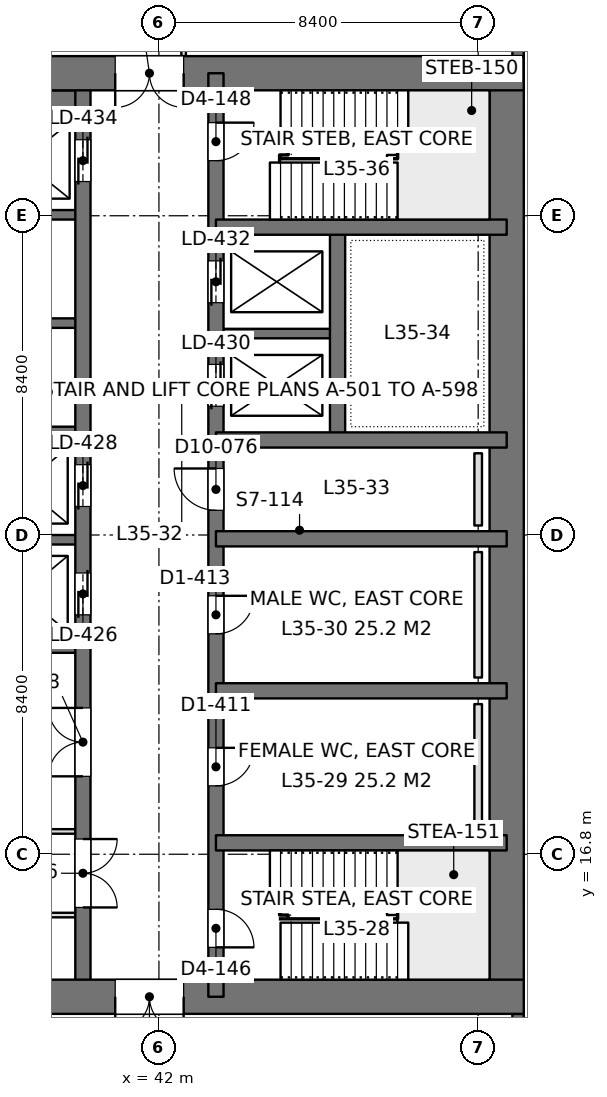
"""IFC4 building model, lengths in metres.
Left out: names, types, materials, properties, quantities, classifications, styles, units other than length and angle.
Written with IfcOpenShell. Run it as: python <this file> out.ifc"""

import sys

from ifc_helpers import new_model, si_unit, direction, frame, frame_2d, origin, place, context, subcontext, project, spatial, rectangle, extrude, element, fill, save


model = new_model("IFC4")
c1 = context("Model", 3, precision=1e-05, world=origin(), true_north=direction((0.0, 1.0)))
c2 = subcontext(c1, "Body", "Model", "MODEL_VIEW")
j1 = project(units=[si_unit("LENGTHUNIT", "METRE"), si_unit("PLANEANGLEUNIT", "RADIAN")], contexts=[c1])
p1 = place(None, origin())
s1 = spatial("IfcSite", under=j1, at=p1, CompositionType="ELEMENT")
p2 = place(p1, origin())
s2 = spatial("IfcBuilding", under=s1, at=p2, CompositionType="ELEMENT")
p3 = place(p2, frame((0.0, 0.0, 155.4)))
s3 = spatial("IfcBuildingStorey", under=s2, at=p3, CompositionType="ELEMENT", Elevation=155.4)
p4 = place(p3, frame((33.6, 13.05, 0.0), z_axis=(0.0, 0.0, 1.0), x_axis=(1.0, 0.0, 0.0)))
e1 = element("IfcWall", 1, at=p4, inside=s3, PredefinedType="SHEAR", context=c2, shape_type="SweptSolid", body=[
    extrude(rectangle(XDim=18.0, YDim=0.9, at=frame_2d((9.0, 0.0))), origin(), (0.0, 0.0, 1.0), 4.2),
])
p5 = place(p4, frame((7.25, 0.0, 0.0)))
e2 = element("IfcOpeningElement", 2, at=p5, cuts=e1, PredefinedType="OPENING", context=c2, shape_type="SweptSolid", body=[
    extrude(rectangle(XDim=1.8, YDim=2.4, at=frame_2d((0.9, 1.2))), frame((0.0, 0.46, 0.0), z_axis=(0.0, -1.0, 0.0), x_axis=(1.0, 0.0, 0.0)), (0.0, 0.0, 1.0), 0.92),
])
p6 = place(p3, frame((33.6, 37.35, 0.0), z_axis=(0.0, 0.0, 1.0), x_axis=(1.0, 0.0, 0.0)))
e3 = element("IfcWall", 3, at=p6, inside=s3, PredefinedType="SHEAR", context=c2, shape_type="SweptSolid", body=[
    extrude(rectangle(XDim=18.0, YDim=0.9, at=frame_2d((9.0, 0.0))), origin(), (0.0, 0.0, 1.0), 4.2),
])
p7 = place(p6, frame((7.25, 0.0, 0.0)))
e4 = element("IfcOpeningElement", 4, at=p7, cuts=e3, PredefinedType="OPENING", context=c2, shape_type="SweptSolid", body=[
    extrude(rectangle(XDim=1.8, YDim=2.4, at=frame_2d((0.9, 1.2))), frame((0.0, 0.46, 0.0), z_axis=(0.0, -1.0, 0.0), x_axis=(1.0, 0.0, 0.0)), (0.0, 0.0, 1.0), 0.92),
])
p8 = place(p3, frame((51.15, 13.05, 0.0), z_axis=(0.0, 0.0, 1.0), x_axis=(0.0, 1.0, 0.0)))
e5 = element("IfcWall", 5, at=p8, inside=s3, PredefinedType="SHEAR", context=c2, shape_type="SweptSolid", body=[
    extrude(rectangle(XDim=24.3, YDim=0.9, at=frame_2d((12.15, 0.0))), origin(), (0.0, 0.0, 1.0), 4.2),
])
p9 = place(p3, frame((43.5, 13.05, 0.0), z_axis=(0.0, 0.0, 1.0), x_axis=(0.0, 1.0, 0.0)))
e6 = element("IfcWall", 6, at=p9, inside=s3, PredefinedType="SHEAR", context=c2, shape_type="SweptSolid", body=[
    extrude(rectangle(XDim=24.3, YDim=0.4, at=frame_2d((12.15, 0.0))), origin(), (0.0, 0.0, 1.0), 4.2),
])
p10 = place(p9, frame((1.3, 0.0, 0.0)))
e7 = element("IfcOpeningElement", 7, at=p10, cuts=e6, PredefinedType="OPENING", context=c2, shape_type="SweptSolid", body=[
    extrude(rectangle(XDim=1.0, YDim=2.2, at=frame_2d((0.5, 1.1))), frame((0.0, 0.21, 0.0), z_axis=(0.0, -1.0, 0.0), x_axis=(1.0, 0.0, 0.0)), (0.0, 0.0, 1.0), 0.42),
])
p11 = place(p9, frame((22.0, 0.0, 0.0)))
e8 = element("IfcOpeningElement", 8, at=p11, cuts=e6, PredefinedType="OPENING", context=c2, shape_type="SweptSolid", body=[
    extrude(rectangle(XDim=1.0, YDim=2.2, at=frame_2d((0.5, 1.1))), frame((0.0, 0.21, 0.0), z_axis=(0.0, -1.0, 0.0), x_axis=(1.0, 0.0, 0.0)), (0.0, 0.0, 1.0), 0.42),
])
p12 = place(p9, frame((5.55, 0.0, 0.0)))
e9 = element("IfcOpeningElement", 9, at=p12, cuts=e6, PredefinedType="OPENING", context=c2, shape_type="SweptSolid", body=[
    extrude(rectangle(XDim=1.0, YDim=2.2, at=frame_2d((0.5, 1.1))), frame((0.0, 0.21, 0.0), z_axis=(0.0, -1.0, 0.0), x_axis=(1.0, 0.0, 0.0)), (0.0, 0.0, 1.0), 0.42),
])
p13 = place(p9, frame((9.55, 0.0, 0.0)))
e10 = element("IfcOpeningElement", 10, at=p13, cuts=e6, PredefinedType="OPENING", context=c2, shape_type="SweptSolid", body=[
    extrude(rectangle(XDim=1.0, YDim=2.2, at=frame_2d((0.5, 1.1))), frame((0.0, 0.21, 0.0), z_axis=(0.0, -1.0, 0.0), x_axis=(1.0, 0.0, 0.0)), (0.0, 0.0, 1.0), 0.42),
])
p14 = place(p9, frame((12.8, 0.0, 0.0)))
e11 = element("IfcOpeningElement", 11, at=p14, cuts=e6, PredefinedType="OPENING", context=c2, shape_type="SweptSolid", body=[
    extrude(rectangle(XDim=1.1, YDim=2.2, at=frame_2d((0.55, 1.1))), frame((0.0, 0.21, 0.0), z_axis=(0.0, -1.0, 0.0), x_axis=(1.0, 0.0, 0.0)), (0.0, 0.0, 1.0), 0.42),
])
p15 = place(p9, frame((15.538, 0.0, 0.0)))
e12 = element("IfcOpeningElement", 12, at=p15, cuts=e6, PredefinedType="OPENING", context=c2, shape_type="SweptSolid", body=[
    extrude(rectangle(XDim=1.1, YDim=2.2, at=frame_2d((0.55, 1.1))), frame((0.0, 0.21, 0.0), z_axis=(0.0, -1.0, 0.0), x_axis=(1.0, 0.0, 0.0)), (0.0, 0.0, 1.0), 0.42),
])
p16 = place(p9, frame((18.262, 0.0, 0.0)))
e13 = element("IfcOpeningElement", 13, at=p16, cuts=e6, PredefinedType="OPENING", context=c2, shape_type="SweptSolid", body=[
    extrude(rectangle(XDim=1.1, YDim=2.2, at=frame_2d((0.55, 1.1))), frame((0.0, 0.21, 0.0), z_axis=(0.0, -1.0, 0.0), x_axis=(1.0, 0.0, 0.0)), (0.0, 0.0, 1.0), 0.42),
])
p17 = place(p3, frame((40.0, 13.05, 0.0), z_axis=(0.0, 0.0, 1.0), x_axis=(0.0, 1.0, 0.0)))
e14 = element("IfcWall", 14, at=p17, inside=s3, PredefinedType="SHEAR", context=c2, shape_type="SweptSolid", body=[
    extrude(rectangle(XDim=24.3, YDim=0.4, at=frame_2d((12.15, 0.0))), origin(), (0.0, 0.0, 1.0), 4.2),
])
p18 = place(p17, frame((10.05, 0.0, 0.0)))
e15 = element("IfcOpeningElement", 15, at=p18, cuts=e14, PredefinedType="OPENING", context=c2, shape_type="SweptSolid", body=[
    extrude(rectangle(XDim=1.1, YDim=2.2, at=frame_2d((0.55, 1.1))), frame((0.0, 0.21, 0.0), z_axis=(0.0, -1.0, 0.0), x_axis=(1.0, 0.0, 0.0)), (0.0, 0.0, 1.0), 0.42),
])
p19 = place(p17, frame((12.9, 0.0, 0.0)))
e16 = element("IfcOpeningElement", 16, at=p19, cuts=e14, PredefinedType="OPENING", context=c2, shape_type="SweptSolid", body=[
    extrude(rectangle(XDim=1.1, YDim=2.2, at=frame_2d((0.55, 1.1))), frame((0.0, 0.21, 0.0), z_axis=(0.0, -1.0, 0.0), x_axis=(1.0, 0.0, 0.0)), (0.0, 0.0, 1.0), 0.42),
])
p20 = place(p17, frame((21.45, 0.0, 0.0)))
e17 = element("IfcOpeningElement", 17, at=p20, cuts=e14, PredefinedType="OPENING", context=c2, shape_type="SweptSolid", body=[
    extrude(rectangle(XDim=1.1, YDim=2.2, at=frame_2d((0.55, 1.1))), frame((0.0, 0.21, 0.0), z_axis=(0.0, -1.0, 0.0), x_axis=(1.0, 0.0, 0.0)), (0.0, 0.0, 1.0), 0.42),
])
p21 = place(p17, frame((2.35, 0.0, 0.0)))
e18 = element("IfcOpeningElement", 18, at=p21, cuts=e14, PredefinedType="OPENING", context=c2, shape_type="SweptSolid", body=[
    extrude(rectangle(XDim=1.8, YDim=2.4, at=frame_2d((0.9, 1.2))), frame((0.0, 0.21, 0.0), z_axis=(0.0, -1.0, 0.0), x_axis=(1.0, 0.0, 0.0)), (0.0, 0.0, 1.0), 0.42),
])
p22 = place(p17, frame((5.8, 0.0, 0.0)))
e19 = element("IfcOpeningElement", 19, at=p22, cuts=e14, PredefinedType="OPENING", context=c2, shape_type="SweptSolid", body=[
    extrude(rectangle(XDim=1.8, YDim=2.4, at=frame_2d((0.9, 1.2))), frame((0.0, 0.21, 0.0), z_axis=(0.0, -1.0, 0.0), x_axis=(1.0, 0.0, 0.0)), (0.0, 0.0, 1.0), 0.42),
])
for number, where, z_axis, x_axis in (
    (20, (51.15, 17.1, 0.0), (0.0, 0.0, 1.0), (-1.0, 0.0, 0.0)),
    (21, (51.15, 21.1, 0.0), (0.0, 0.0, 1.0), (-1.0, 0.0, 0.0)),
    (22, (51.15, 25.1, 0.0), (0.0, 0.0, 1.0), (-1.0, 0.0, 0.0)),
    (23, (51.15, 27.7, 0.0), (0.0, 0.0, 1.0), (-1.0, 0.0, 0.0)),
    (24, (51.15, 33.3, 0.0), (0.0, 0.0, 1.0), (-1.0, 0.0, 0.0)),
):
    element("IfcWall", number, at=place(p3, frame(where, z_axis=z_axis, x_axis=x_axis)), inside=s3, PredefinedType="SHEAR", context=c2, shape_type="SweptSolid", body=[
        extrude(rectangle(XDim=7.65, YDim=0.4, at=frame_2d((3.825, 0.0))), origin(), (0.0, 0.0, 1.0), 4.2),
    ])
p23 = place(p3, frame((46.7, 27.7, 0.0), z_axis=(0.0, 0.0, 1.0), x_axis=(0.0, 1.0, 0.0)))
e25 = element("IfcWall", 25, at=p23, inside=s3, PredefinedType="SHEAR", context=c2, shape_type="SweptSolid", body=[
    extrude(rectangle(XDim=5.6, YDim=0.4, at=frame_2d((2.8, 0.0))), origin(), (0.0, 0.0, 1.0), 4.2),
])
p24 = place(p3, frame((46.7, 30.5, 0.0), z_axis=(0.0, 0.0, 1.0), x_axis=(-1.0, 0.0, 0.0)))
e26 = element("IfcWall", 26, at=p24, inside=s3, PredefinedType="SHEAR", context=c2, shape_type="SweptSolid", body=[
    extrude(rectangle(XDim=3.2, YDim=0.25, at=frame_2d((1.6, 0.0))), origin(), (0.0, 0.0, 1.0), 4.2),
])
p25 = place(p3, frame((40.0, 22.225, 0.0), z_axis=(0.0, 0.0, 1.0), x_axis=(-1.0, 0.0, 0.0)))
e27 = element("IfcWall", 27, at=p25, inside=s3, PredefinedType="SHEAR", context=c2, shape_type="SweptSolid", body=[
    extrude(rectangle(XDim=5.95, YDim=0.25, at=frame_2d((2.975, 0.0))), origin(), (0.0, 0.0, 1.0), 4.2),
])
for number, where, z_axis, x_axis in (
    (28, (40.0, 25.075, 0.0), (0.0, 0.0, 1.0), (-1.0, 0.0, 0.0)),
    (29, (40.0, 27.925, 0.0), (0.0, 0.0, 1.0), (-1.0, 0.0, 0.0)),
    (30, (40.0, 30.775, 0.0), (0.0, 0.0, 1.0), (-1.0, 0.0, 0.0)),
    (31, (40.0, 33.625, 0.0), (0.0, 0.0, 1.0), (-1.0, 0.0, 0.0)),
):
    element("IfcWall", number, at=place(p3, frame(where, z_axis=z_axis, x_axis=x_axis)), inside=s3, PredefinedType="SHEAR", context=c2, shape_type="SweptSolid", body=[
        extrude(rectangle(XDim=3.2, YDim=0.25, at=frame_2d((1.6, 0.0))), origin(), (0.0, 0.0, 1.0), 4.2),
    ])
p26 = place(p3, frame((40.0, 36.625, 0.0), z_axis=(0.0, 0.0, 1.0), x_axis=(-1.0, 0.0, 0.0)))
e32 = element("IfcWall", 32, at=p26, inside=s3, PredefinedType="SHEAR", context=c2, shape_type="SweptSolid", body=[
    extrude(rectangle(XDim=3.2, YDim=0.55, at=frame_2d((1.6, 0.0))), origin(), (0.0, 0.0, 1.0), 4.2),
])
p27 = place(p3, frame((51.45, 42.0, 0.0), z_axis=(0.0, 0.0, 1.0), x_axis=(0.0, -1.0, 0.0)))
e33 = element("IfcWall", 33, at=p27, inside=s3, PredefinedType="SOLIDWALL", context=c2, shape_type="SweptSolid", body=[
    extrude(rectangle(XDim=4.2, YDim=0.3, at=frame_2d((2.1, 0.0))), origin(), (0.0, 0.0, 1.0), 4.05),
])
p28 = place(p27, frame((0.9, 0.0, 0.9)))
e34 = element("IfcOpeningElement", 34, at=p28, cuts=e33, PredefinedType="OPENING", context=c2, shape_type="SweptSolid", body=[
    extrude(rectangle(XDim=2.4, YDim=1.9, at=frame_2d((1.2, 0.95))), frame((0.0, 0.16, 0.0), z_axis=(0.0, -1.0, 0.0), x_axis=(1.0, 0.0, 0.0)), (0.0, 0.0, 1.0), 0.32),
])
p29 = place(p3, frame((51.45, 12.6, 0.0), z_axis=(0.0, 0.0, 1.0), x_axis=(0.0, -1.0, 0.0)))
e35 = element("IfcWall", 35, at=p29, inside=s3, PredefinedType="SOLIDWALL", context=c2, shape_type="SweptSolid", body=[
    extrude(rectangle(XDim=4.2, YDim=0.3, at=frame_2d((2.1, 0.0))), origin(), (0.0, 0.0, 1.0), 4.05),
])
p30 = place(p29, frame((0.9, 0.0, 0.9)))
e36 = element("IfcOpeningElement", 36, at=p30, cuts=e35, PredefinedType="OPENING", context=c2, shape_type="SweptSolid", body=[
    extrude(rectangle(XDim=2.4, YDim=1.9, at=frame_2d((1.2, 0.95))), frame((0.0, 0.16, 0.0), z_axis=(0.0, -1.0, 0.0), x_axis=(1.0, 0.0, 0.0)), (0.0, 0.0, 1.0), 0.32),
])
p31 = place(p3, frame((33.898, 17.4, 0.0), z_axis=(0.0, 0.0, 1.0), x_axis=(1.0, 0.0, 0.0)))
e37 = element("IfcWall", 37, at=p31, inside=s3, PredefinedType="PARTITIONING", context=c2, shape_type="SweptSolid", body=[
    extrude(rectangle(XDim=5.904, YDim=0.12, at=frame_2d((2.952, 0.0))), origin(), (0.0, 0.0, 1.0), 3.55),
])
p32 = place(p31, frame((0.38, 0.0, 0.0)))
e38 = element("IfcOpeningElement", 38, at=p32, cuts=e37, PredefinedType="OPENING", context=c2, shape_type="SweptSolid", body=[
    extrude(rectangle(XDim=1.0, YDim=2.4, at=frame_2d((0.5, 1.2))), frame((0.0, 0.07, 0.0), z_axis=(0.0, -1.0, 0.0), x_axis=(1.0, 0.0, 0.0)), (0.0, 0.0, 1.0), 0.14),
])
p33 = place(p3, frame((33.598, 15.2, 0.0), z_axis=(0.0, 0.0, 1.0), x_axis=(1.0, 0.0, 0.0)))
e39 = element("IfcWall", 39, at=p33, inside=s3, PredefinedType="PARTITIONING", context=c2, shape_type="SweptSolid", body=[
    extrude(rectangle(XDim=6.204, YDim=0.12, at=frame_2d((3.102, 0.0))), origin(), (0.0, 0.0, 1.0), 3.55),
])
p34 = place(p3, frame((42.65, 37.8, 0.0), z_axis=(0.0, 0.0, 1.0), x_axis=(0.0, 1.0, 0.0)))
e40 = element("IfcWall", 40, at=p34, inside=s3, PredefinedType="PARTITIONING", context=c2, shape_type="SweptSolid", body=[
    extrude(rectangle(XDim=2.0, YDim=0.12, at=frame_2d((1.0, 0.0))), origin(), (0.0, 0.0, 1.0), 4.05),
])
for number, where, z_axis, x_axis in (
    (41, (50.4, 17.45, 0.0), (0.0, 0.0, 1.0), (0.0, 1.0, 0.0)),
    (42, (50.4, 21.45, 0.0), (0.0, 0.0, 1.0), (0.0, 1.0, 0.0)),
):
    element("IfcWall", number, at=place(p3, frame(where, z_axis=z_axis, x_axis=x_axis)), inside=s3, PredefinedType="PLUMBINGWALL", context=c2, shape_type="SweptSolid", body=[
        extrude(rectangle(XDim=3.3, YDim=0.2, at=frame_2d((1.65, 0.0))), origin(), (0.0, 0.0, 1.0), 1.2),
    ])
p35 = place(p3, frame((50.4, 25.45, 0.0), z_axis=(0.0, 0.0, 1.0), x_axis=(0.0, 1.0, 0.0)))
e43 = element("IfcWall", 43, at=p35, inside=s3, PredefinedType="PLUMBINGWALL", context=c2, shape_type="SweptSolid", body=[
    extrude(rectangle(XDim=1.9, YDim=0.2, at=frame_2d((0.95, 0.0))), origin(), (0.0, 0.0, 1.0), 1.2),
])
p36 = place(p5, frame((1.8, 0.0, 0.0), z_axis=(0.0, 0.0, 1.0), x_axis=(-1.0, 0.0, 0.0)))
e44 = element("IfcDoor", 44, at=p36, inside=s3, OperationType="DOUBLE_DOOR_SINGLE_SWING", PredefinedType="DOOR", context=c2, shape_type="SweptSolid", body=[
    extrude(rectangle(XDim=1.8, YDim=2.4, at=frame_2d((0.9, 1.2))), frame((0.0, 0.025, 0.0), z_axis=(0.0, -1.0, 0.0), x_axis=(1.0, 0.0, 0.0)), (0.0, 0.0, 1.0), 0.05),
])
fill(e2, e44)
p37 = place(p7, frame((1.8, 0.0, 0.0), z_axis=(0.0, 0.0, 1.0), x_axis=(-1.0, 0.0, 0.0)))
e45 = element("IfcDoor", 45, at=p37, inside=s3, OperationType="DOUBLE_DOOR_SINGLE_SWING", PredefinedType="DOOR", context=c2, shape_type="SweptSolid", body=[
    extrude(rectangle(XDim=1.8, YDim=2.4, at=frame_2d((0.9, 1.2))), frame((0.0, 0.025, 0.0), z_axis=(0.0, -1.0, 0.0), x_axis=(1.0, 0.0, 0.0)), (0.0, 0.0, 1.0), 0.05),
])
fill(e4, e45)
p38 = place(p10, frame((1.0, 0.0, 0.0), z_axis=(0.0, 0.0, 1.0), x_axis=(-1.0, 0.0, 0.0)))
e46 = element("IfcDoor", 46, at=p38, inside=s3, OperationType="SINGLE_SWING_RIGHT", PredefinedType="DOOR", context=c2, shape_type="SweptSolid", body=[
    extrude(rectangle(XDim=1.0, YDim=2.2, at=frame_2d((0.5, 1.1))), frame((0.0, 0.025, 0.0), z_axis=(0.0, -1.0, 0.0), x_axis=(1.0, 0.0, 0.0)), (0.0, 0.0, 1.0), 0.05),
])
fill(e7, e46)
p39 = place(p11, frame((1.0, 0.0, 0.0), z_axis=(0.0, 0.0, 1.0), x_axis=(-1.0, 0.0, 0.0)))
e47 = element("IfcDoor", 47, at=p39, inside=s3, OperationType="SINGLE_SWING_LEFT", PredefinedType="DOOR", context=c2, shape_type="SweptSolid", body=[
    extrude(rectangle(XDim=1.0, YDim=2.2, at=frame_2d((0.5, 1.1))), frame((0.0, 0.025, 0.0), z_axis=(0.0, -1.0, 0.0), x_axis=(1.0, 0.0, 0.0)), (0.0, 0.0, 1.0), 0.05),
])
fill(e8, e47)
p40 = place(p12, frame((1.0, 0.0, 0.0), z_axis=(0.0, 0.0, 1.0), x_axis=(-1.0, 0.0, 0.0)))
e48 = element("IfcDoor", 48, at=p40, inside=s3, OperationType="SINGLE_SWING_LEFT", PredefinedType="DOOR", context=c2, shape_type="SweptSolid", body=[
    extrude(rectangle(XDim=1.0, YDim=2.2, at=frame_2d((0.5, 1.1))), frame((0.0, 0.025, 0.0), z_axis=(0.0, -1.0, 0.0), x_axis=(1.0, 0.0, 0.0)), (0.0, 0.0, 1.0), 0.05),
])
fill(e9, e48)
p41 = place(p13, frame((1.0, 0.0, 0.0), z_axis=(0.0, 0.0, 1.0), x_axis=(-1.0, 0.0, 0.0)))
e49 = element("IfcDoor", 49, at=p41, inside=s3, OperationType="SINGLE_SWING_LEFT", PredefinedType="DOOR", context=c2, shape_type="SweptSolid", body=[
    extrude(rectangle(XDim=1.0, YDim=2.2, at=frame_2d((0.5, 1.1))), frame((0.0, 0.025, 0.0), z_axis=(0.0, -1.0, 0.0), x_axis=(1.0, 0.0, 0.0)), (0.0, 0.0, 1.0), 0.05),
])
fill(e10, e49)
p42 = place(p14, origin())
e50 = element("IfcDoor", 50, at=p42, inside=s3, OperationType="SINGLE_SWING_RIGHT", PredefinedType="DOOR", context=c2, shape_type="SweptSolid", body=[
    extrude(rectangle(XDim=1.1, YDim=2.2, at=frame_2d((0.55, 1.1))), frame((0.0, 0.025, 0.0), z_axis=(0.0, -1.0, 0.0), x_axis=(1.0, 0.0, 0.0)), (0.0, 0.0, 1.0), 0.05),
])
fill(e11, e50)
p43 = place(p18, origin())
e51 = element("IfcDoor", 51, at=p43, inside=s3, OperationType="DOUBLE_DOOR_SLIDING", PredefinedType="DOOR", context=c2, shape_type="SweptSolid", body=[
    extrude(rectangle(XDim=1.1, YDim=2.2, at=frame_2d((0.55, 1.1))), frame((0.0, 0.025, 0.0), z_axis=(0.0, -1.0, 0.0), x_axis=(1.0, 0.0, 0.0)), (0.0, 0.0, 1.0), 0.05),
])
fill(e15, e51)
p44 = place(p19, origin())
e52 = element("IfcDoor", 52, at=p44, inside=s3, OperationType="DOUBLE_DOOR_SLIDING", PredefinedType="DOOR", context=c2, shape_type="SweptSolid", body=[
    extrude(rectangle(XDim=1.1, YDim=2.2, at=frame_2d((0.55, 1.1))), frame((0.0, 0.025, 0.0), z_axis=(0.0, -1.0, 0.0), x_axis=(1.0, 0.0, 0.0)), (0.0, 0.0, 1.0), 0.05),
])
fill(e16, e52)
p45 = place(p20, origin())
e53 = element("IfcDoor", 53, at=p45, inside=s3, OperationType="DOUBLE_DOOR_SLIDING", PredefinedType="DOOR", context=c2, shape_type="SweptSolid", body=[
    extrude(rectangle(XDim=1.1, YDim=2.2, at=frame_2d((0.55, 1.1))), frame((0.0, 0.025, 0.0), z_axis=(0.0, -1.0, 0.0), x_axis=(1.0, 0.0, 0.0)), (0.0, 0.0, 1.0), 0.05),
])
fill(e17, e53)
p46 = place(p15, origin())
e54 = element("IfcDoor", 54, at=p46, inside=s3, OperationType="DOUBLE_DOOR_SLIDING", PredefinedType="DOOR", context=c2, shape_type="SweptSolid", body=[
    extrude(rectangle(XDim=1.1, YDim=2.2, at=frame_2d((0.55, 1.1))), frame((0.0, 0.025, 0.0), z_axis=(0.0, -1.0, 0.0), x_axis=(1.0, 0.0, 0.0)), (0.0, 0.0, 1.0), 0.05),
])
fill(e12, e54)
p47 = place(p16, origin())
e55 = element("IfcDoor", 55, at=p47, inside=s3, OperationType="DOUBLE_DOOR_SLIDING", PredefinedType="DOOR", context=c2, shape_type="SweptSolid", body=[
    extrude(rectangle(XDim=1.1, YDim=2.2, at=frame_2d((0.55, 1.1))), frame((0.0, 0.025, 0.0), z_axis=(0.0, -1.0, 0.0), x_axis=(1.0, 0.0, 0.0)), (0.0, 0.0, 1.0), 0.05),
])
fill(e13, e55)
p48 = place(p21, frame((1.8, 0.0, 0.0), z_axis=(0.0, 0.0, 1.0), x_axis=(-1.0, 0.0, 0.0)))
e56 = element("IfcDoor", 56, at=p48, inside=s3, OperationType="DOUBLE_DOOR_SINGLE_SWING", PredefinedType="DOOR", context=c2, shape_type="SweptSolid", body=[
    extrude(rectangle(XDim=1.8, YDim=2.4, at=frame_2d((0.9, 1.2))), frame((0.0, 0.025, 0.0), z_axis=(0.0, -1.0, 0.0), x_axis=(1.0, 0.0, 0.0)), (0.0, 0.0, 1.0), 0.05),
])
fill(e18, e56)
p49 = place(p22, origin())
e57 = element("IfcDoor", 57, at=p49, inside=s3, OperationType="DOUBLE_DOOR_SINGLE_SWING", PredefinedType="DOOR", context=c2, shape_type="SweptSolid", body=[
    extrude(rectangle(XDim=1.8, YDim=2.4, at=frame_2d((0.9, 1.2))), frame((0.0, 0.025, 0.0), z_axis=(0.0, -1.0, 0.0), x_axis=(1.0, 0.0, 0.0)), (0.0, 0.0, 1.0), 0.05),
])
fill(e19, e57)
save(model, sys.argv[1])
